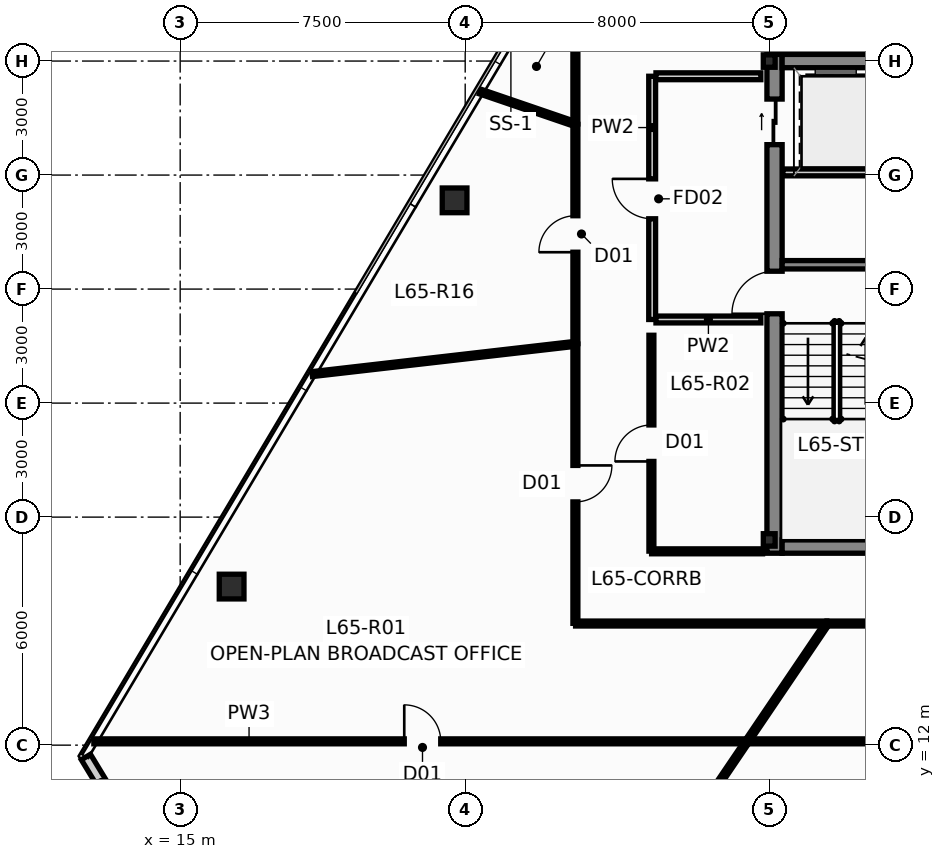
"""IFC4 building model, lengths in metres.
Left out: names, types, materials, properties, quantities, classifications, styles, units other than length and angle.
Written with IfcOpenShell. Run it as: python <this file> out.ifc"""

import sys

from ifc_helpers import new_model, si_unit, direction, frame, frame_2d, origin, origin_2d, place, context, subcontext, project, spatial, rectangle, hollow_rectangle, i_section, extrude, source, transform, mapped, element, fill, save


model = new_model("IFC4")
c1 = context("Model", 3, precision=1e-05, world=origin(), true_north=direction((0.0, 1.0)))
c2 = subcontext(c1, "Body", "Model", "MODEL_VIEW")
j1 = project(units=[si_unit("LENGTHUNIT", "METRE"), si_unit("PLANEANGLEUNIT", "RADIAN")], contexts=[c1])
p1 = place(None, origin())
s1 = spatial("IfcSite", under=j1, at=p1, CompositionType="ELEMENT")
p2 = place(p1, origin())
s2 = spatial("IfcBuilding", under=s1, at=p2, CompositionType="ELEMENT")
p3 = place(p2, frame((0.0, 0.0, 248.1)))
s3 = spatial("IfcBuildingStorey", under=s2, at=p3, CompositionType="ELEMENT", Elevation=248.1)
m1 = source(origin(), c2, "Body", "SweptSolid", [
    extrude(i_section(OverallWidth=0.311, OverallDepth=0.327, WebThickness=0.016, FlangeThickness=0.025, at=origin_2d()), origin(), (0.0, 0.0, 1.0), 3.65),
])
for number, where, z_axis, x_axis in (
    (1, (30.5, 17.4, 0.0), (0.0, 0.0, 1.0), (1.0, 0.0, 0.0)),
    (2, (30.5, 30.0, 0.0), (0.0, 0.0, 1.0), (1.0, 0.0, 0.0)),
):
    element("IfcColumn", number, at=place(p3, frame(where, z_axis=z_axis, x_axis=x_axis)), inside=s3, PredefinedType="COLUMN", context=c2, shape_type="MappedRepresentation", body=[
        mapped(m1, transform((0.0, 0.0, 0.0), scale=1.0)),
    ])
p4 = place(p3, frame((30.64, 17.05, 0.0), z_axis=(0.0, 0.0, 1.0), x_axis=(0.0, 1.0, 0.0)))
e3 = element("IfcWall", 3, at=p4, inside=s3, PredefinedType="SHEAR", context=c2, shape_type="SweptSolid", body=[
    extrude(rectangle(XDim=13.125, YDim=0.4, at=frame_2d((6.562, 0.0))), origin(), (0.0, 0.0, 1.0), 3.65),
])
p5 = place(p4, frame((6.3, 0.0, 0.0)))
e4 = element("IfcOpeningElement", 4, at=p5, cuts=e3, PredefinedType="OPENING", context=c2, shape_type="SweptSolid", body=[
    extrude(rectangle(XDim=1.12, YDim=2.15, at=frame_2d((0.56, 1.075))), frame((0.0, 0.212, 0.0), z_axis=(0.0, -1.0, 0.0), x_axis=(1.0, 0.0, 0.0)), (0.0, 0.0, 1.0), 0.424),
])
p6 = place(p4, frame((10.75, 0.0, 0.0)))
e5 = element("IfcOpeningElement", 5, at=p6, cuts=e3, PredefinedType="OPENING", context=c2, shape_type="SweptSolid", body=[
    extrude(rectangle(XDim=1.2, YDim=2.2, at=frame_2d((0.6, 1.1))), frame((0.0, 0.212, 0.0), z_axis=(0.0, -1.0, 0.0), x_axis=(1.0, 0.0, 0.0)), (0.0, 0.0, 1.0), 0.424),
])
for number, where, z_axis, x_axis in (
    (6, (30.84, 17.225, 0.0), (0.0, 0.0, 1.0), (1.0, 0.0, 0.0)),
    (7, (30.84, 30.0, 0.0), (0.0, 0.0, 1.0), (1.0, 0.0, 0.0)),
):
    element("IfcWall", number, at=place(p3, frame(where, z_axis=z_axis, x_axis=x_axis)), inside=s3, PredefinedType="SHEAR", context=c2, shape_type="SweptSolid", body=[
        extrude(rectangle(XDim=2.9, YDim=0.35, at=frame_2d((1.45, 0.0))), origin(), (0.0, 0.0, 1.0), 3.65),
    ])
p7 = place(p3, frame((30.84, 24.64, 0.0), z_axis=(0.0, 0.0, 1.0), x_axis=(1.0, 0.0, 0.0)))
e8 = element("IfcWall", 8, at=p7, inside=s3, PredefinedType="SHEAR", context=c2, shape_type="SweptSolid", body=[
    extrude(rectangle(XDim=2.9, YDim=0.22, at=frame_2d((1.45, 0.0))), origin(), (0.0, 0.0, 1.0), 3.65),
])
m2 = source(origin(), c2, "Body", "SweptSolid", [
    extrude(hollow_rectangle(XDim=0.65, YDim=0.65, WallThickness=0.04, at=origin_2d()), origin(), (0.0, 0.0, 1.0), 3.651),
])
p8 = place(p3, frame((22.221, 26.335, 0.0), z_axis=(0.014913313399, -0.013776424037, 0.999793880369), x_axis=(0.678553674548, 0.734550822447, 0.0)))
e9 = element("IfcColumn", 9, at=p8, inside=s3, PredefinedType="COLUMN", context=c2, shape_type="MappedRepresentation", body=[
    mapped(m2, transform((0.0, 0.0, 0.0), scale=1.0)),
])
m3 = source(origin(), c2, "Body", "SweptSolid", [
    extrude(hollow_rectangle(XDim=0.65, YDim=0.65, WallThickness=0.04, at=origin_2d()), origin(), (0.0, 0.0, 1.0), 3.651),
])
p9 = place(p3, frame((16.354, 16.172, 0.0), z_axis=(0.010364932146, -0.021532310652, 0.999714423113), x_axis=(0.901042175273, 0.433731481886, 0.0)))
e10 = element("IfcColumn", 10, at=p9, inside=s3, PredefinedType="COLUMN", context=c2, shape_type="MappedRepresentation", body=[
    mapped(m3, transform((0.0, 0.0, 0.0), scale=1.0)),
])
p10 = place(p3, frame((14.764, 7.988, 0.0), z_axis=(0.0, 0.0, 1.0), x_axis=(-0.518720491589, 0.854943887986, 0.0)))
e11 = element("IfcWall", 11, at=p10, inside=s3, PredefinedType="STANDARD", context=c2, shape_type="SweptSolid", body=[
    extrude(rectangle(XDim=4.328, YDim=0.28, at=frame_2d((2.164, 0.0))), origin(), (0.0, 0.0, 1.0), 3.4),
])
p11 = place(p10, frame((1.56, 0.0, 0.9)))
e12 = element("IfcOpeningElement", 12, at=p11, cuts=e11, PredefinedType="OPENING", context=c2, shape_type="SweptSolid", body=[
    extrude(rectangle(XDim=1.2, YDim=1.65, at=frame_2d((0.6, 0.825))), frame((0.0, 0.152, 0.0), z_axis=(0.0, -1.0, 0.0), x_axis=(1.0, 0.0, 0.0)), (0.0, 0.0, 1.0), 0.304),
])
p12 = place(p3, frame((27.42, 23.2, 0.0), z_axis=(0.0, 0.0, 1.0), x_axis=(0.0, 1.0, 0.0)))
e13 = element("IfcWall", 13, at=p12, inside=s3, PredefinedType="PARTITIONING", context=c2, shape_type="SweptSolid", body=[
    extrude(rectangle(XDim=6.4, YDim=0.18, at=frame_2d((3.2, 0.0))), origin(), (0.0, 0.0, 1.0), 3.085),
])
p13 = place(p12, frame((2.65, 0.0, 0.0)))
e14 = element("IfcOpeningElement", 14, at=p13, cuts=e13, PredefinedType="OPENING", context=c2, shape_type="SweptSolid", body=[
    extrude(rectangle(XDim=1.05, YDim=2.15, at=frame_2d((0.525, 1.075))), frame((0.0, 0.102, 0.0), z_axis=(0.0, -1.0, 0.0), x_axis=(1.0, 0.0, 0.0)), (0.0, 0.0, 1.0), 0.204),
])
for number, where, z_axis, x_axis in (
    (15, (27.52, 23.2, 0.0), (0.0, 0.0, 1.0), (1.0, 0.0, 0.0)),
    (16, (27.52, 29.6, 0.0), (0.0, 0.0, 1.0), (1.0, 0.0, 0.0)),
):
    element("IfcWall", number, at=place(p3, frame(where, z_axis=z_axis, x_axis=x_axis)), inside=s3, PredefinedType="PARTITIONING", context=c2, shape_type="SweptSolid", body=[
        extrude(rectangle(XDim=2.76, YDim=0.18, at=frame_2d((1.38, 0.0))), origin(), (0.0, 0.0, 1.0), 3.4),
    ])
p14 = place(p3, frame((30.86, 27.07, 0.0), z_axis=(0.0, 0.0, 1.0), x_axis=(1.0, 0.0, 0.0)))
e17 = element("IfcWall", 17, at=p14, inside=s3, PredefinedType="PARTITIONING", context=c2, shape_type="SweptSolid", body=[
    extrude(rectangle(XDim=2.9, YDim=0.18, at=frame_2d((1.45, 0.0))), origin(), (0.0, 0.0, 1.0), 3.4),
])
p15 = place(p3, frame((12.729, 12.1, 0.0), z_axis=(0.0, 0.0, 1.0), x_axis=(1.0, 0.0, 0.0)))
e18 = element("IfcWall", 18, at=p15, inside=s3, PredefinedType="PARTITIONING", context=c2, shape_type="SweptSolid", body=[
    extrude(rectangle(XDim=17.187, YDim=0.13, at=frame_2d((8.593, 0.0))), origin(), (0.0, 0.0, 1.0), 3.085),
])
p16 = place(p15, frame((8.168, 0.0, 0.0)))
e19 = element("IfcOpeningElement", 19, at=p16, cuts=e18, PredefinedType="OPENING", context=c2, shape_type="SweptSolid", body=[
    extrude(rectangle(XDim=0.96, YDim=2.15, at=frame_2d((0.48, 1.075))), frame((0.0, 0.077, 0.0), z_axis=(0.0, -1.0, 0.0), x_axis=(1.0, 0.0, 0.0)), (0.0, 0.0, 1.0), 0.154),
])
p17 = place(p3, frame((29.925, 12.1, 0.0), z_axis=(0.0, 0.0, 1.0), x_axis=(1.0, 0.0, 0.0)))
e20 = element("IfcWall", 20, at=p17, inside=s3, PredefinedType="PARTITIONING", context=c2, shape_type="SweptSolid", body=[
    extrude(rectangle(XDim=7.92, YDim=0.13, at=frame_2d((3.96, 0.0))), origin(), (0.0, 0.0, 1.0), 3.085),
])
p18 = place(p17, frame((3.48, 0.0, 0.0)))
e21 = element("IfcOpeningElement", 21, at=p18, cuts=e20, PredefinedType="OPENING", context=c2, shape_type="SweptSolid", body=[
    extrude(rectangle(XDim=0.96, YDim=2.15, at=frame_2d((0.48, 1.075))), frame((0.0, 0.077, 0.0), z_axis=(0.0, -1.0, 0.0), x_axis=(1.0, 0.0, 0.0)), (0.0, 0.0, 1.0), 0.154),
])
p19 = place(p3, frame((25.4, 22.555, 0.0), z_axis=(0.0, 0.0, 1.0), x_axis=(0.0, -1.0, 0.0)))
e22 = element("IfcWall", 22, at=p19, inside=s3, PredefinedType="PARTITIONING", context=c2, shape_type="SweptSolid", body=[
    extrude(rectangle(XDim=7.35, YDim=0.13, at=frame_2d((3.675, 0.0))), origin(), (0.0, 0.0, 1.0), 3.085),
])
p20 = place(p19, frame((3.195, 0.0, 0.0)))
e23 = element("IfcOpeningElement", 23, at=p20, cuts=e22, PredefinedType="OPENING", context=c2, shape_type="SweptSolid", body=[
    extrude(rectangle(XDim=0.96, YDim=2.15, at=frame_2d((0.48, 1.075))), frame((0.0, 0.077, 0.0), z_axis=(0.0, -1.0, 0.0), x_axis=(1.0, 0.0, 0.0)), (0.0, 0.0, 1.0), 0.154),
])
p21 = place(p3, frame((18.474, 21.763, 0.0), z_axis=(0.0, 0.0, 1.0), x_axis=(0.99345291011, 0.114242353768, 0.0)))
e24 = element("IfcWall", 24, at=p21, inside=s3, PredefinedType="PARTITIONING", context=c2, shape_type="SweptSolid", body=[
    extrude(rectangle(XDim=6.967, YDim=0.13, at=frame_2d((3.483, 0.0))), origin(), (0.0, 0.0, 1.0), 3.4),
])
p22 = place(p3, frame((25.405, 15.2, 0.0), z_axis=(0.0, 0.0, 1.0), x_axis=(1.0, 0.0, 0.0)))
e25 = element("IfcWall", 25, at=p22, inside=s3, PredefinedType="PARTITIONING", context=c2, shape_type="SweptSolid", body=[
    extrude(rectangle(XDim=6.61, YDim=0.13, at=frame_2d((3.305, 0.0))), origin(), (0.0, 0.0, 1.0), 3.085),
])
p23 = place(p3, frame((32.025, 15.2, 0.0), z_axis=(0.0, 0.0, 1.0), x_axis=(1.0, 0.0, 0.0)))
e26 = element("IfcWall", 26, at=p23, inside=s3, PredefinedType="PARTITIONING", context=c2, shape_type="SweptSolid", body=[
    extrude(rectangle(XDim=5.86, YDim=0.13, at=frame_2d((2.93, 0.0))), origin(), (0.0, 0.0, 1.0), 3.085),
])
p24 = place(p23, frame((2.45, 0.0, 0.0)))
e27 = element("IfcOpeningElement", 27, at=p24, cuts=e26, PredefinedType="OPENING", context=c2, shape_type="SweptSolid", body=[
    extrude(rectangle(XDim=0.96, YDim=2.15, at=frame_2d((0.48, 1.075))), frame((0.0, 0.077, 0.0), z_axis=(0.0, -1.0, 0.0), x_axis=(1.0, 0.0, 0.0)), (0.0, 0.0, 1.0), 0.154),
])
p25 = place(p3, frame((25.4, 22.565, 0.0), z_axis=(0.0, 0.0, 1.0), x_axis=(0.0, 1.0, 0.0)))
e28 = element("IfcWall", 28, at=p25, inside=s3, PredefinedType="PARTITIONING", context=c2, shape_type="SweptSolid", body=[
    extrude(rectangle(XDim=5.77, YDim=0.13, at=frame_2d((2.885, 0.0))), origin(), (0.0, 0.0, 1.0), 3.085),
])
p26 = place(p25, frame((2.405, 0.0, 0.0)))
e29 = element("IfcOpeningElement", 29, at=p26, cuts=e28, PredefinedType="OPENING", context=c2, shape_type="SweptSolid", body=[
    extrude(rectangle(XDim=0.96, YDim=2.15, at=frame_2d((0.48, 1.075))), frame((0.0, 0.077, 0.0), z_axis=(0.0, -1.0, 0.0), x_axis=(1.0, 0.0, 0.0)), (0.0, 0.0, 1.0), 0.154),
])
p27 = place(p3, frame((27.4, 17.105, 0.0), z_axis=(0.0, 0.0, 1.0), x_axis=(0.0, 1.0, 0.0)))
e30 = element("IfcWall", 30, at=p27, inside=s3, PredefinedType="PARTITIONING", context=c2, shape_type="SweptSolid", body=[
    extrude(rectangle(XDim=5.68, YDim=0.13, at=frame_2d((2.84, 0.0))), origin(), (0.0, 0.0, 1.0), 3.085),
])
p28 = place(p27, frame((2.36, 0.0, 0.0)))
e31 = element("IfcOpeningElement", 31, at=p28, cuts=e30, PredefinedType="OPENING", context=c2, shape_type="SweptSolid", body=[
    extrude(rectangle(XDim=0.96, YDim=2.15, at=frame_2d((0.48, 1.075))), frame((0.0, 0.077, 0.0), z_axis=(0.0, -1.0, 0.0), x_axis=(1.0, 0.0, 0.0)), (0.0, 0.0, 1.0), 0.154),
])
p29 = place(p3, frame((27.035, 7.846, 0.0), z_axis=(0.0, 0.0, 1.0), x_axis=(0.561211858798, 0.827672187248, 0.0)))
e32 = element("IfcWall", 32, at=p29, inside=s3, PredefinedType="PARTITIONING", context=c2, shape_type="SweptSolid", body=[
    extrude(rectangle(XDim=5.135, YDim=0.13, at=frame_2d((2.567, 0.0))), origin(), (0.0, 0.0, 1.0), 3.4),
])
p30 = place(p3, frame((25.4, 28.345, 0.0), z_axis=(0.0, 0.0, 1.0), x_axis=(0.0, 1.0, 0.0)))
e33 = element("IfcWall", 33, at=p30, inside=s3, PredefinedType="PARTITIONING", context=c2, shape_type="SweptSolid", body=[
    extrude(rectangle(XDim=3.8, YDim=0.13, at=frame_2d((1.9, 0.0))), origin(), (0.0, 0.0, 1.0), 3.4),
])
p31 = place(p3, frame((29.923, 12.104, 0.0), z_axis=(0.0, 0.0, 1.0), x_axis=(0.560735386259, 0.827995064355, 0.0)))
e34 = element("IfcWall", 34, at=p31, inside=s3, PredefinedType="PARTITIONING", context=c2, shape_type="SweptSolid", body=[
    extrude(rectangle(XDim=3.734, YDim=0.13, at=frame_2d((1.867, 0.0))), origin(), (0.0, 0.0, 1.0), 3.4),
])
p32 = place(p3, frame((30.325, 17.1, 0.0), z_axis=(0.0, 0.0, 1.0), x_axis=(-1.0, 0.0, 0.0)))
e35 = element("IfcWall", 35, at=p32, inside=s3, PredefinedType="PARTITIONING", context=c2, shape_type="SweptSolid", body=[
    extrude(rectangle(XDim=2.92, YDim=0.13, at=frame_2d((1.46, 0.0))), origin(), (0.0, 0.0, 1.0), 2.985),
])
p33 = place(p3, frame((22.894, 29.198, 0.0), z_axis=(0.0, 0.0, 1.0), x_axis=(0.946140904487, -0.323755137189, 0.0)))
e36 = element("IfcWall", 36, at=p33, inside=s3, PredefinedType="PARTITIONING", context=c2, shape_type="SweptSolid", body=[
    extrude(rectangle(XDim=2.643, YDim=0.13, at=frame_2d((1.322, 0.0))), origin(), (0.0, 0.0, 1.0), 3.4),
])
p34 = place(p5, origin())
e37 = element("IfcDoor", 37, at=p34, inside=s3, OperationType="SINGLE_SWING_LEFT", PredefinedType="DOOR", context=c2, shape_type="SweptSolid", body=[
    extrude(rectangle(XDim=1.12, YDim=2.15, at=frame_2d((0.56, 1.075))), frame((0.0, 0.025, 0.0), z_axis=(0.0, -1.0, 0.0), x_axis=(1.0, 0.0, 0.0)), (0.0, 0.0, 1.0), 0.05),
])
fill(e4, e37)
p35 = place(p6, origin())
e38 = element("IfcDoor", 38, at=p35, inside=s3, OperationType="SLIDING_TO_LEFT", PredefinedType="DOOR", context=c2, shape_type="SweptSolid", body=[
    extrude(rectangle(XDim=1.2, YDim=2.2, at=frame_2d((0.6, 1.1))), frame((0.0, 0.025, 0.0), z_axis=(0.0, -1.0, 0.0), x_axis=(1.0, 0.0, 0.0)), (0.0, 0.0, 1.0), 0.05),
])
fill(e5, e38)
p36 = place(p13, origin())
e39 = element("IfcDoor", 39, at=p36, inside=s3, OperationType="SINGLE_SWING_RIGHT", PredefinedType="DOOR", context=c2, shape_type="SweptSolid", body=[
    extrude(rectangle(XDim=1.05, YDim=2.15, at=frame_2d((0.525, 1.075))), frame((0.0, 0.025, 0.0), z_axis=(0.0, -1.0, 0.0), x_axis=(1.0, 0.0, 0.0)), (0.0, 0.0, 1.0), 0.05),
])
fill(e14, e39)
p37 = place(p16, origin())
e40 = element("IfcDoor", 40, at=p37, inside=s3, OperationType="SINGLE_SWING_LEFT", PredefinedType="DOOR", context=c2, shape_type="SweptSolid", body=[
    extrude(rectangle(XDim=0.96, YDim=2.15, at=frame_2d((0.48, 1.075))), frame((0.0, 0.025, 0.0), z_axis=(0.0, -1.0, 0.0), x_axis=(1.0, 0.0, 0.0)), (0.0, 0.0, 1.0), 0.05),
])
fill(e19, e40)
p38 = place(p20, origin())
e41 = element("IfcDoor", 41, at=p38, inside=s3, OperationType="SINGLE_SWING_LEFT", PredefinedType="DOOR", context=c2, shape_type="SweptSolid", body=[
    extrude(rectangle(XDim=0.96, YDim=2.15, at=frame_2d((0.48, 1.075))), frame((0.0, 0.025, 0.0), z_axis=(0.0, -1.0, 0.0), x_axis=(1.0, 0.0, 0.0)), (0.0, 0.0, 1.0), 0.05),
])
fill(e23, e41)
p39 = place(p26, origin())
e42 = element("IfcDoor", 42, at=p39, inside=s3, OperationType="SINGLE_SWING_LEFT", PredefinedType="DOOR", context=c2, shape_type="SweptSolid", body=[
    extrude(rectangle(XDim=0.96, YDim=2.15, at=frame_2d((0.48, 1.075))), frame((0.0, 0.025, 0.0), z_axis=(0.0, -1.0, 0.0), x_axis=(1.0, 0.0, 0.0)), (0.0, 0.0, 1.0), 0.05),
])
fill(e29, e42)
p40 = place(p28, origin())
e43 = element("IfcDoor", 43, at=p40, inside=s3, OperationType="SINGLE_SWING_LEFT", PredefinedType="DOOR", context=c2, shape_type="SweptSolid", body=[
    extrude(rectangle(XDim=0.96, YDim=2.15, at=frame_2d((0.48, 1.075))), frame((0.0, 0.025, 0.0), z_axis=(0.0, -1.0, 0.0), x_axis=(1.0, 0.0, 0.0)), (0.0, 0.0, 1.0), 0.05),
])
fill(e31, e43)
save(model, sys.argv[1])
